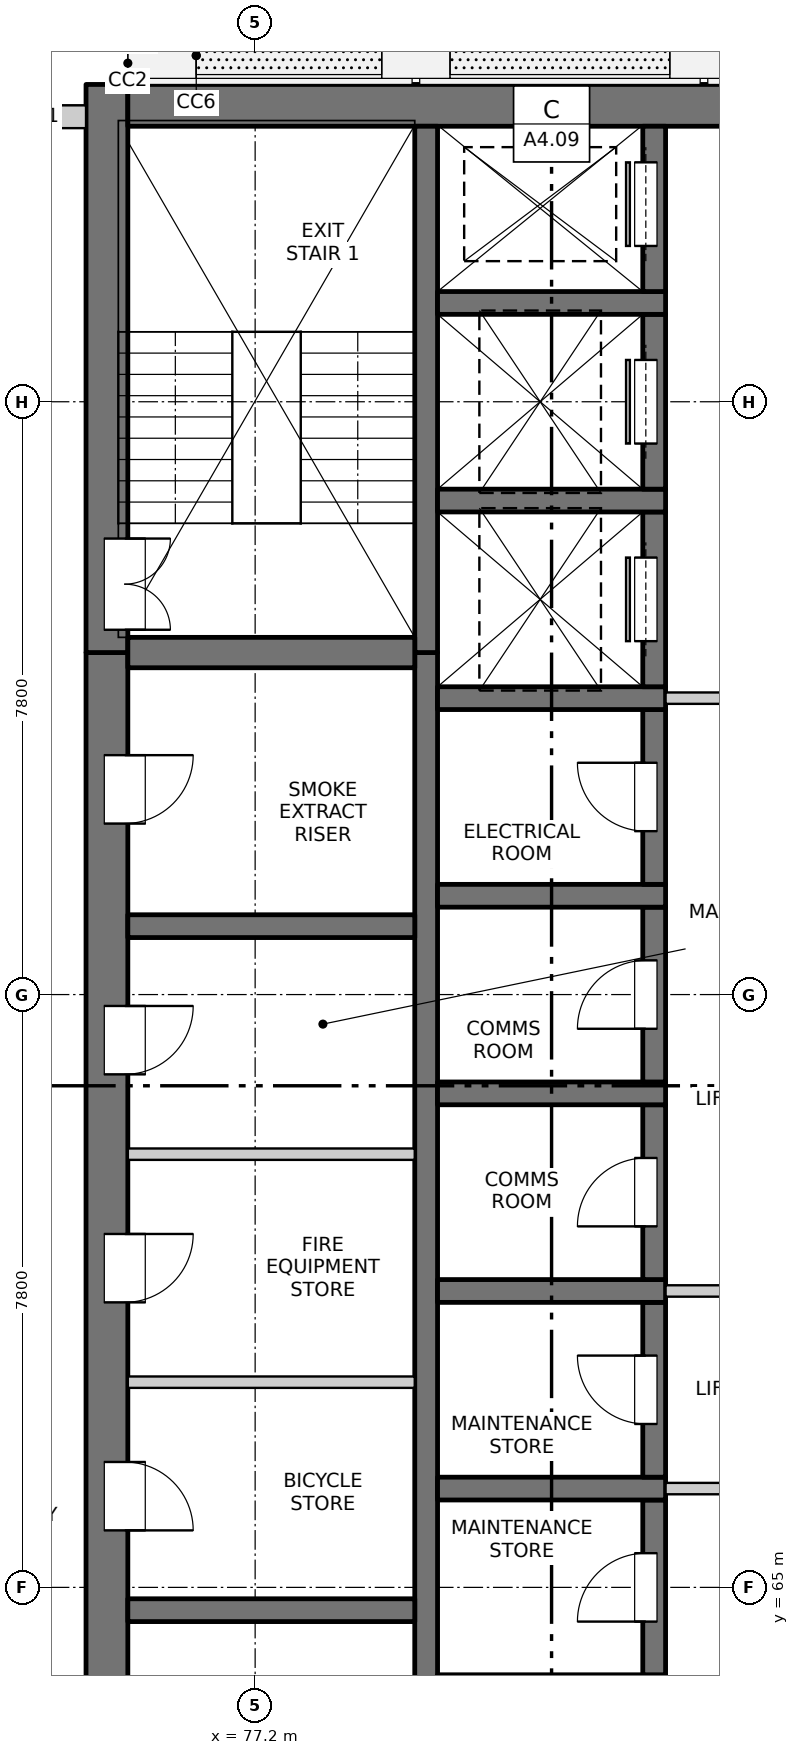
"""IFC4 building model, lengths in metres.
Left out: names, types, materials, properties, quantities, classifications, styles, units other than length and angle.
Written with IfcOpenShell. Run it as: python <this file> out.ifc"""

import sys

from ifc_helpers import new_model, si_unit, direction, frame, frame_2d, origin, place, context, subcontext, project, spatial, rectangle, extrude, element, fill, save


model = new_model("IFC4")
c1 = context("Model", 3, precision=1e-05, world=origin(), true_north=direction((0.0, 1.0)))
c2 = subcontext(c1, "Body", "Model", "MODEL_VIEW")
j1 = project(units=[si_unit("LENGTHUNIT", "METRE"), si_unit("PLANEANGLEUNIT", "RADIAN")], contexts=[c1])
p1 = place(None, origin())
s1 = spatial("IfcSite", under=j1, at=p1, CompositionType="ELEMENT")
p2 = place(p1, origin())
s2 = spatial("IfcBuilding", under=s1, at=p2, CompositionType="ELEMENT")
p3 = place(p2, frame((0.0, 0.0, 189.4)))
s3 = spatial("IfcBuildingStorey", under=s2, at=p3, CompositionType="ELEMENT", Elevation=189.4)
p4 = place(p3, frame((75.25, 54.975, -0.25), z_axis=(0.0, 0.0, 1.0), x_axis=(0.0, 1.0, 0.0)))
e1 = element("IfcWall", 1, at=p4, inside=s3, PredefinedType="SOLIDWALL", context=c2, shape_type="SweptSolid", body=[
    extrude(rectangle(XDim=22.325, YDim=0.55, at=frame_2d((11.163, 0.0))), origin(), (0.0, 0.0, 1.0), 3.35),
])
p5 = place(p4, frame((7.475, 0.0, 0.25)))
e2 = element("IfcOpeningElement", 2, at=p5, cuts=e1, PredefinedType="OPENING", context=c2, shape_type="SweptSolid", body=[
    extrude(rectangle(XDim=0.9, YDim=2.1, at=frame_2d((0.45, 1.05))), frame((0.0, 0.285, 0.0), z_axis=(0.0, -1.0, 0.0), x_axis=(1.0, 0.0, 0.0)), (0.0, 0.0, 1.0), 0.57),
])
p6 = place(p4, frame((10.775, 0.0, 0.25)))
e3 = element("IfcOpeningElement", 3, at=p6, cuts=e1, PredefinedType="OPENING", context=c2, shape_type="SweptSolid", body=[
    extrude(rectangle(XDim=0.9, YDim=2.1, at=frame_2d((0.45, 1.05))), frame((0.0, 0.285, 0.0), z_axis=(0.0, -1.0, 0.0), x_axis=(1.0, 0.0, 0.0)), (0.0, 0.0, 1.0), 0.57),
])
p7 = place(p4, frame((13.775, 0.0, 0.25)))
e4 = element("IfcOpeningElement", 4, at=p7, cuts=e1, PredefinedType="OPENING", context=c2, shape_type="SweptSolid", body=[
    extrude(rectangle(XDim=0.9, YDim=2.1, at=frame_2d((0.45, 1.05))), frame((0.0, 0.285, 0.0), z_axis=(0.0, -1.0, 0.0), x_axis=(1.0, 0.0, 0.0)), (0.0, 0.0, 1.0), 0.57),
])
p8 = place(p4, frame((16.775, 0.0, 0.25)))
e5 = element("IfcOpeningElement", 5, at=p8, cuts=e1, PredefinedType="OPENING", context=c2, shape_type="SweptSolid", body=[
    extrude(rectangle(XDim=0.9, YDim=2.1, at=frame_2d((0.45, 1.05))), frame((0.0, 0.285, 0.0), z_axis=(0.0, -1.0, 0.0), x_axis=(1.0, 0.0, 0.0)), (0.0, 0.0, 1.0), 0.57),
])
p9 = place(p4, frame((20.075, 0.0, 0.25)))
e6 = element("IfcOpeningElement", 6, at=p9, cuts=e1, PredefinedType="OPENING", context=c2, shape_type="SweptSolid", body=[
    extrude(rectangle(XDim=0.9, YDim=2.1, at=frame_2d((0.45, 1.05))), frame((0.0, 0.285, 0.0), z_axis=(0.0, -1.0, 0.0), x_axis=(1.0, 0.0, 0.0)), (0.0, 0.0, 1.0), 0.57),
])
p10 = place(p3, frame((75.25, 77.3, -0.25), z_axis=(0.0, 0.0, 1.0), x_axis=(0.0, 1.0, 0.0)))
e7 = element("IfcWall", 7, at=p10, inside=s3, PredefinedType="SOLIDWALL", context=c2, shape_type="SweptSolid", body=[
    extrude(rectangle(XDim=7.475, YDim=0.55, at=frame_2d((3.737, 0.0))), origin(), (0.0, 0.0, 1.0), 3.35),
])
p11 = place(p10, frame((0.3, 0.0, 0.25)))
e8 = element("IfcOpeningElement", 8, at=p11, cuts=e7, PredefinedType="OPENING", context=c2, shape_type="SweptSolid", body=[
    extrude(rectangle(XDim=1.2, YDim=2.1, at=frame_2d((0.6, 1.05))), frame((0.0, 0.285, 0.0), z_axis=(0.0, -1.0, 0.0), x_axis=(1.0, 0.0, 0.0)), (0.0, 0.0, 1.0), 0.57),
])
p12 = place(p3, frame((75.525, 84.5, -0.25), z_axis=(0.0, 0.0, 1.0), x_axis=(1.0, 0.0, 0.0)))
e9 = element("IfcWall", 9, at=p12, inside=s3, PredefinedType="SOLIDWALL", context=c2, shape_type="SweptSolid", body=[
    extrude(rectangle(XDim=18.95, YDim=0.55, at=frame_2d((9.475, 0.0))), origin(), (0.0, 0.0, 1.0), 3.35),
])
p13 = place(p3, frame((79.45, 60.95, -0.25), z_axis=(0.0, 0.0, 1.0), x_axis=(0.0, 1.0, 0.0)))
e10 = element("IfcWall", 10, at=p13, inside=s3, PredefinedType="SOLIDWALL", context=c2, shape_type="SweptSolid", body=[
    extrude(rectangle(XDim=16.35, YDim=0.3, at=frame_2d((8.175, 0.0))), origin(), (0.0, 0.0, 1.0), 3.35),
])
p14 = place(p3, frame((79.45, 77.3, -0.25), z_axis=(0.0, 0.0, 1.0), x_axis=(0.0, 1.0, 0.0)))
e11 = element("IfcWall", 11, at=p14, inside=s3, PredefinedType="SOLIDWALL", context=c2, shape_type="SweptSolid", body=[
    extrude(rectangle(XDim=6.925, YDim=0.3, at=frame_2d((3.462, 0.0))), origin(), (0.0, 0.0, 1.0), 3.35),
])
p15 = place(p3, frame((82.45, 63.85, -0.25), z_axis=(0.0, 0.0, 1.0), x_axis=(0.0, 1.0, 0.0)))
e12 = element("IfcWall", 12, at=p15, inside=s3, PredefinedType="SOLIDWALL", context=c2, shape_type="SweptSolid", body=[
    extrude(rectangle(XDim=2.3, YDim=0.3, at=frame_2d((1.15, 0.0))), origin(), (0.0, 0.0, 1.0), 3.35),
])
p16 = place(p15, frame((0.7, 0.0, 0.25)))
e13 = element("IfcOpeningElement", 13, at=p16, cuts=e12, PredefinedType="OPENING", context=c2, shape_type="SweptSolid", body=[
    extrude(rectangle(XDim=0.9, YDim=2.1, at=frame_2d((0.45, 1.05))), frame((0.0, 0.16, 0.0), z_axis=(0.0, -1.0, 0.0), x_axis=(1.0, 0.0, 0.0)), (0.0, 0.0, 1.0), 0.32),
])
p17 = place(p3, frame((79.6, 66.3, -0.25), z_axis=(0.0, 0.0, 1.0), x_axis=(1.0, 0.0, 0.0)))
e14 = element("IfcWall", 14, at=p17, inside=s3, PredefinedType="SOLIDWALL", context=c2, shape_type="SweptSolid", body=[
    extrude(rectangle(XDim=3.0, YDim=0.3, at=frame_2d((1.5, 0.0))), origin(), (0.0, 0.0, 1.0), 3.35),
])
p18 = place(p3, frame((82.45, 66.45, -0.25), z_axis=(0.0, 0.0, 1.0), x_axis=(0.0, 1.0, 0.0)))
e15 = element("IfcWall", 15, at=p18, inside=s3, PredefinedType="SOLIDWALL", context=c2, shape_type="SweptSolid", body=[
    extrude(rectangle(XDim=2.3, YDim=0.3, at=frame_2d((1.15, 0.0))), origin(), (0.0, 0.0, 1.0), 3.35),
])
p19 = place(p18, frame((0.7, 0.0, 0.25)))
e16 = element("IfcOpeningElement", 16, at=p19, cuts=e15, PredefinedType="OPENING", context=c2, shape_type="SweptSolid", body=[
    extrude(rectangle(XDim=0.9, YDim=2.1, at=frame_2d((0.45, 1.05))), frame((0.0, 0.16, 0.0), z_axis=(0.0, -1.0, 0.0), x_axis=(1.0, 0.0, 0.0)), (0.0, 0.0, 1.0), 0.32),
])
p20 = place(p3, frame((79.6, 68.9, -0.25), z_axis=(0.0, 0.0, 1.0), x_axis=(1.0, 0.0, 0.0)))
e17 = element("IfcWall", 17, at=p20, inside=s3, PredefinedType="SOLIDWALL", context=c2, shape_type="SweptSolid", body=[
    extrude(rectangle(XDim=3.0, YDim=0.3, at=frame_2d((1.5, 0.0))), origin(), (0.0, 0.0, 1.0), 3.35),
])
p21 = place(p3, frame((82.45, 69.05, -0.25), z_axis=(0.0, 0.0, 1.0), x_axis=(0.0, 1.0, 0.0)))
e18 = element("IfcWall", 18, at=p21, inside=s3, PredefinedType="SOLIDWALL", context=c2, shape_type="SweptSolid", body=[
    extrude(rectangle(XDim=2.3, YDim=0.3, at=frame_2d((1.15, 0.0))), origin(), (0.0, 0.0, 1.0), 3.35),
])
p22 = place(p21, frame((0.7, 0.0, 0.25)))
e19 = element("IfcOpeningElement", 19, at=p22, cuts=e18, PredefinedType="OPENING", context=c2, shape_type="SweptSolid", body=[
    extrude(rectangle(XDim=0.9, YDim=2.1, at=frame_2d((0.45, 1.05))), frame((0.0, 0.16, 0.0), z_axis=(0.0, -1.0, 0.0), x_axis=(1.0, 0.0, 0.0)), (0.0, 0.0, 1.0), 0.32),
])
p23 = place(p3, frame((79.6, 71.5, -0.25), z_axis=(0.0, 0.0, 1.0), x_axis=(1.0, 0.0, 0.0)))
e20 = element("IfcWall", 20, at=p23, inside=s3, PredefinedType="SOLIDWALL", context=c2, shape_type="SweptSolid", body=[
    extrude(rectangle(XDim=3.0, YDim=0.3, at=frame_2d((1.5, 0.0))), origin(), (0.0, 0.0, 1.0), 3.35),
])
p24 = place(p3, frame((82.45, 71.65, -0.25), z_axis=(0.0, 0.0, 1.0), x_axis=(0.0, 1.0, 0.0)))
e21 = element("IfcWall", 21, at=p24, inside=s3, PredefinedType="SOLIDWALL", context=c2, shape_type="SweptSolid", body=[
    extrude(rectangle(XDim=2.3, YDim=0.3, at=frame_2d((1.15, 0.0))), origin(), (0.0, 0.0, 1.0), 3.35),
])
p25 = place(p24, frame((0.7, 0.0, 0.25)))
e22 = element("IfcOpeningElement", 22, at=p25, cuts=e21, PredefinedType="OPENING", context=c2, shape_type="SweptSolid", body=[
    extrude(rectangle(XDim=0.9, YDim=2.1, at=frame_2d((0.45, 1.05))), frame((0.0, 0.16, 0.0), z_axis=(0.0, -1.0, 0.0), x_axis=(1.0, 0.0, 0.0)), (0.0, 0.0, 1.0), 0.32),
])
p26 = place(p3, frame((79.6, 74.1, -0.25), z_axis=(0.0, 0.0, 1.0), x_axis=(1.0, 0.0, 0.0)))
e23 = element("IfcWall", 23, at=p26, inside=s3, PredefinedType="SOLIDWALL", context=c2, shape_type="SweptSolid", body=[
    extrude(rectangle(XDim=3.0, YDim=0.3, at=frame_2d((1.5, 0.0))), origin(), (0.0, 0.0, 1.0), 3.35),
])
p27 = place(p3, frame((82.45, 74.25, -0.25), z_axis=(0.0, 0.0, 1.0), x_axis=(0.0, 1.0, 0.0)))
e24 = element("IfcWall", 24, at=p27, inside=s3, PredefinedType="SOLIDWALL", context=c2, shape_type="SweptSolid", body=[
    extrude(rectangle(XDim=2.3, YDim=0.3, at=frame_2d((1.15, 0.0))), origin(), (0.0, 0.0, 1.0), 3.35),
])
p28 = place(p27, frame((0.7, 0.0, 0.25)))
e25 = element("IfcOpeningElement", 25, at=p28, cuts=e24, PredefinedType="OPENING", context=c2, shape_type="SweptSolid", body=[
    extrude(rectangle(XDim=0.9, YDim=2.1, at=frame_2d((0.45, 1.05))), frame((0.0, 0.16, 0.0), z_axis=(0.0, -1.0, 0.0), x_axis=(1.0, 0.0, 0.0)), (0.0, 0.0, 1.0), 0.32),
])
p29 = place(p3, frame((79.6, 76.7, -0.25), z_axis=(0.0, 0.0, 1.0), x_axis=(1.0, 0.0, 0.0)))
e26 = element("IfcWall", 26, at=p29, inside=s3, PredefinedType="SOLIDWALL", context=c2, shape_type="SweptSolid", body=[
    extrude(rectangle(XDim=3.0, YDim=0.3, at=frame_2d((1.5, 0.0))), origin(), (0.0, 0.0, 1.0), 3.35),
])
p30 = place(p3, frame((82.45, 76.85, -0.25), z_axis=(0.0, 0.0, 1.0), x_axis=(0.0, 1.0, 0.0)))
e27 = element("IfcWall", 27, at=p30, inside=s3, PredefinedType="SOLIDWALL", context=c2, shape_type="SweptSolid", body=[
    extrude(rectangle(XDim=2.3, YDim=0.3, at=frame_2d((1.15, 0.0))), origin(), (0.0, 0.0, 1.0), 3.35),
])
p31 = place(p30, frame((0.6, 0.0, 0.25)))
e28 = element("IfcOpeningElement", 28, at=p31, cuts=e27, PredefinedType="OPENING", context=c2, shape_type="SweptSolid", body=[
    extrude(rectangle(XDim=1.1, YDim=2.1, at=frame_2d((0.55, 1.05))), frame((0.0, 0.16, 0.0), z_axis=(0.0, -1.0, 0.0), x_axis=(1.0, 0.0, 0.0)), (0.0, 0.0, 1.0), 0.32),
])
p32 = place(p3, frame((79.6, 79.3, -0.25), z_axis=(0.0, 0.0, 1.0), x_axis=(1.0, 0.0, 0.0)))
e29 = element("IfcWall", 29, at=p32, inside=s3, PredefinedType="SOLIDWALL", context=c2, shape_type="SweptSolid", body=[
    extrude(rectangle(XDim=3.0, YDim=0.3, at=frame_2d((1.5, 0.0))), origin(), (0.0, 0.0, 1.0), 3.35),
])
p33 = place(p3, frame((82.45, 79.45, -0.25), z_axis=(0.0, 0.0, 1.0), x_axis=(0.0, 1.0, 0.0)))
e30 = element("IfcWall", 30, at=p33, inside=s3, PredefinedType="SOLIDWALL", context=c2, shape_type="SweptSolid", body=[
    extrude(rectangle(XDim=2.3, YDim=0.3, at=frame_2d((1.15, 0.0))), origin(), (0.0, 0.0, 1.0), 3.35),
])
p34 = place(p33, frame((0.6, 0.0, 0.25)))
e31 = element("IfcOpeningElement", 31, at=p34, cuts=e30, PredefinedType="OPENING", context=c2, shape_type="SweptSolid", body=[
    extrude(rectangle(XDim=1.1, YDim=2.1, at=frame_2d((0.55, 1.05))), frame((0.0, 0.16, 0.0), z_axis=(0.0, -1.0, 0.0), x_axis=(1.0, 0.0, 0.0)), (0.0, 0.0, 1.0), 0.32),
])
p35 = place(p3, frame((79.6, 81.9, -0.25), z_axis=(0.0, 0.0, 1.0), x_axis=(1.0, 0.0, 0.0)))
e32 = element("IfcWall", 32, at=p35, inside=s3, PredefinedType="SOLIDWALL", context=c2, shape_type="SweptSolid", body=[
    extrude(rectangle(XDim=3.0, YDim=0.3, at=frame_2d((1.5, 0.0))), origin(), (0.0, 0.0, 1.0), 3.35),
])
p36 = place(p3, frame((82.45, 82.05, -0.25), z_axis=(0.0, 0.0, 1.0), x_axis=(0.0, 1.0, 0.0)))
e33 = element("IfcWall", 33, at=p36, inside=s3, PredefinedType="SOLIDWALL", context=c2, shape_type="SweptSolid", body=[
    extrude(rectangle(XDim=2.175, YDim=0.3, at=frame_2d((1.087, 0.0))), origin(), (0.0, 0.0, 1.0), 3.35),
])
p37 = place(p36, frame((0.6, 0.0, 0.25)))
e34 = element("IfcOpeningElement", 34, at=p37, cuts=e33, PredefinedType="OPENING", context=c2, shape_type="SweptSolid", body=[
    extrude(rectangle(XDim=1.1, YDim=2.1, at=frame_2d((0.55, 1.05))), frame((0.0, 0.16, 0.0), z_axis=(0.0, -1.0, 0.0), x_axis=(1.0, 0.0, 0.0)), (0.0, 0.0, 1.0), 0.32),
])
for number, where, z_axis, x_axis in (
    (35, (75.525, 64.7, -0.25), (0.0, 0.0, 1.0), (1.0, 0.0, 0.0)),
    (36, (75.525, 73.7, -0.25), (0.0, 0.0, 1.0), (1.0, 0.0, 0.0)),
):
    element("IfcWall", number, at=place(p3, frame(where, z_axis=z_axis, x_axis=x_axis)), inside=s3, PredefinedType="SOLIDWALL", context=c2, shape_type="SweptSolid", body=[
        extrude(rectangle(XDim=3.775, YDim=0.3, at=frame_2d((1.888, 0.0))), origin(), (0.0, 0.0, 1.0), 3.35),
    ])
p38 = place(p3, frame((75.525, 77.3, -0.25), z_axis=(0.0, 0.0, 1.0), x_axis=(1.0, 0.0, 0.0)))
e37 = element("IfcWall", 37, at=p38, inside=s3, PredefinedType="SOLIDWALL", context=c2, shape_type="SweptSolid", body=[
    extrude(rectangle(XDim=3.775, YDim=0.4, at=frame_2d((1.888, 0.0))), origin(), (0.0, 0.0, 1.0), 3.35),
])
p39 = place(p3, frame((73.675, 84.35, 0.0), z_axis=(0.0, 0.0, 1.0), x_axis=(1.0, 0.0, 0.0)))
e38 = element("IfcWall", 38, at=p39, inside=s3, PredefinedType="SOLIDWALL", context=c2, shape_type="SweptSolid", body=[
    extrude(rectangle(XDim=1.3, YDim=0.3, at=frame_2d((0.65, 0.0))), origin(), (0.0, 0.0, 1.0), 3.1),
])
p40 = place(p3, frame((82.6, 66.3, 0.0), z_axis=(0.0, 0.0, 1.0), x_axis=(1.0, 0.0, 0.0)))
e39 = element("IfcWall", 39, at=p40, inside=s3, PredefinedType="PARTITIONING", context=c2, shape_type="SweptSolid", body=[
    extrude(rectangle(XDim=4.8, YDim=0.15, at=frame_2d((2.4, 0.0))), origin(), (0.0, 0.0, 1.0), 3.1),
])
p41 = place(p40, frame((1.5, 0.0, 0.0)))
e40 = element("IfcOpeningElement", 40, at=p41, cuts=e39, PredefinedType="OPENING", context=c2, shape_type="SweptSolid", body=[
    extrude(rectangle(XDim=1.8, YDim=2.1, at=frame_2d((0.9, 1.05))), frame((0.0, 0.085, 0.0), z_axis=(0.0, -1.0, 0.0), x_axis=(1.0, 0.0, 0.0)), (0.0, 0.0, 1.0), 0.17),
])
p42 = place(p3, frame((75.525, 67.7, 0.0), z_axis=(0.0, 0.0, 1.0), x_axis=(1.0, 0.0, 0.0)))
e41 = element("IfcWall", 41, at=p42, inside=s3, PredefinedType="PARTITIONING", context=c2, shape_type="SweptSolid", body=[
    extrude(rectangle(XDim=3.775, YDim=0.15, at=frame_2d((1.887, 0.0))), origin(), (0.0, 0.0, 1.0), 3.1),
])
p43 = place(p3, frame((82.6, 68.9, 0.0), z_axis=(0.0, 0.0, 1.0), x_axis=(1.0, 0.0, 0.0)))
e42 = element("IfcWall", 42, at=p43, inside=s3, PredefinedType="PARTITIONING", context=c2, shape_type="SweptSolid", body=[
    extrude(rectangle(XDim=4.8, YDim=0.15, at=frame_2d((2.4, 0.0))), origin(), (0.0, 0.0, 1.0), 3.1),
])
p44 = place(p43, frame((1.5, 0.0, 0.0)))
e43 = element("IfcOpeningElement", 43, at=p44, cuts=e42, PredefinedType="OPENING", context=c2, shape_type="SweptSolid", body=[
    extrude(rectangle(XDim=1.8, YDim=2.1, at=frame_2d((0.9, 1.05))), frame((0.0, 0.085, 0.0), z_axis=(0.0, -1.0, 0.0), x_axis=(1.0, 0.0, 0.0)), (0.0, 0.0, 1.0), 0.17),
])
p45 = place(p3, frame((75.525, 70.7, 0.0), z_axis=(0.0, 0.0, 1.0), x_axis=(1.0, 0.0, 0.0)))
e44 = element("IfcWall", 44, at=p45, inside=s3, PredefinedType="PARTITIONING", context=c2, shape_type="SweptSolid", body=[
    extrude(rectangle(XDim=3.775, YDim=0.15, at=frame_2d((1.887, 0.0))), origin(), (0.0, 0.0, 1.0), 3.1),
])
p46 = place(p3, frame((82.6, 76.7, 0.0), z_axis=(0.0, 0.0, 1.0), x_axis=(1.0, 0.0, 0.0)))
e45 = element("IfcWall", 45, at=p46, inside=s3, PredefinedType="PARTITIONING", context=c2, shape_type="SweptSolid", body=[
    extrude(rectangle(XDim=4.8, YDim=0.15, at=frame_2d((2.4, 0.0))), origin(), (0.0, 0.0, 1.0), 3.1),
])
p47 = place(p46, frame((1.5, 0.0, 0.0)))
e46 = element("IfcOpeningElement", 46, at=p47, cuts=e45, PredefinedType="OPENING", context=c2, shape_type="SweptSolid", body=[
    extrude(rectangle(XDim=1.8, YDim=2.1, at=frame_2d((0.9, 1.05))), frame((0.0, 0.085, 0.0), z_axis=(0.0, -1.0, 0.0), x_axis=(1.0, 0.0, 0.0)), (0.0, 0.0, 1.0), 0.17),
])
p48 = place(p16, origin())
e47 = element("IfcDoor", 47, at=p48, inside=s3, OperationType="SINGLE_SWING_LEFT", PredefinedType="DOOR", context=c2, shape_type="SweptSolid", body=[
    extrude(rectangle(XDim=0.9, YDim=2.1, at=frame_2d((0.45, 1.05))), frame((0.0, 0.135, 0.0), z_axis=(0.0, -1.0, 0.0), x_axis=(1.0, 0.0, 0.0)), (0.0, 0.0, 1.0), 0.05),
])
fill(e13, e47)
p49 = place(p6, origin())
e48 = element("IfcDoor", 48, at=p49, inside=s3, OperationType="SINGLE_SWING_RIGHT", PredefinedType="DOOR", context=c2, shape_type="SweptSolid", body=[
    extrude(rectangle(XDim=0.9, YDim=2.1, at=frame_2d((0.45, 1.05))), frame((0.0, -0.21, 0.0), z_axis=(0.0, -1.0, 0.0), x_axis=(1.0, 0.0, 0.0)), (0.0, 0.0, 1.0), 0.05),
])
fill(e3, e48)
p50 = place(p19, origin())
e49 = element("IfcDoor", 49, at=p50, inside=s3, OperationType="SINGLE_SWING_RIGHT", PredefinedType="DOOR", context=c2, shape_type="SweptSolid", body=[
    extrude(rectangle(XDim=0.9, YDim=2.1, at=frame_2d((0.45, 1.05))), frame((0.0, 0.135, 0.0), z_axis=(0.0, -1.0, 0.0), x_axis=(1.0, 0.0, 0.0)), (0.0, 0.0, 1.0), 0.05),
])
fill(e16, e49)
p51 = place(p7, origin())
e50 = element("IfcDoor", 50, at=p51, inside=s3, OperationType="SINGLE_SWING_LEFT", PredefinedType="DOOR", context=c2, shape_type="SweptSolid", body=[
    extrude(rectangle(XDim=0.9, YDim=2.1, at=frame_2d((0.45, 1.05))), frame((0.0, -0.21, 0.0), z_axis=(0.0, -1.0, 0.0), x_axis=(1.0, 0.0, 0.0)), (0.0, 0.0, 1.0), 0.05),
])
fill(e4, e50)
p52 = place(p22, origin())
e51 = element("IfcDoor", 51, at=p52, inside=s3, OperationType="SINGLE_SWING_LEFT", PredefinedType="DOOR", context=c2, shape_type="SweptSolid", body=[
    extrude(rectangle(XDim=0.9, YDim=2.1, at=frame_2d((0.45, 1.05))), frame((0.0, 0.135, 0.0), z_axis=(0.0, -1.0, 0.0), x_axis=(1.0, 0.0, 0.0)), (0.0, 0.0, 1.0), 0.05),
])
fill(e19, e51)
p53 = place(p8, origin())
e52 = element("IfcDoor", 52, at=p53, inside=s3, OperationType="SINGLE_SWING_LEFT", PredefinedType="DOOR", context=c2, shape_type="SweptSolid", body=[
    extrude(rectangle(XDim=0.9, YDim=2.1, at=frame_2d((0.45, 1.05))), frame((0.0, -0.21, 0.0), z_axis=(0.0, -1.0, 0.0), x_axis=(1.0, 0.0, 0.0)), (0.0, 0.0, 1.0), 0.05),
])
fill(e5, e52)
p54 = place(p25, origin())
e53 = element("IfcDoor", 53, at=p54, inside=s3, OperationType="SINGLE_SWING_LEFT", PredefinedType="DOOR", context=c2, shape_type="SweptSolid", body=[
    extrude(rectangle(XDim=0.9, YDim=2.1, at=frame_2d((0.45, 1.05))), frame((0.0, 0.135, 0.0), z_axis=(0.0, -1.0, 0.0), x_axis=(1.0, 0.0, 0.0)), (0.0, 0.0, 1.0), 0.05),
])
fill(e22, e53)
p55 = place(p28, origin())
e54 = element("IfcDoor", 54, at=p55, inside=s3, OperationType="SINGLE_SWING_RIGHT", PredefinedType="DOOR", context=c2, shape_type="SweptSolid", body=[
    extrude(rectangle(XDim=0.9, YDim=2.1, at=frame_2d((0.45, 1.05))), frame((0.0, 0.135, 0.0), z_axis=(0.0, -1.0, 0.0), x_axis=(1.0, 0.0, 0.0)), (0.0, 0.0, 1.0), 0.05),
])
fill(e25, e54)
p56 = place(p9, origin())
e55 = element("IfcDoor", 55, at=p56, inside=s3, OperationType="SINGLE_SWING_LEFT", PredefinedType="DOOR", context=c2, shape_type="SweptSolid", body=[
    extrude(rectangle(XDim=0.9, YDim=2.1, at=frame_2d((0.45, 1.05))), frame((0.0, -0.21, 0.0), z_axis=(0.0, -1.0, 0.0), x_axis=(1.0, 0.0, 0.0)), (0.0, 0.0, 1.0), 0.05),
])
fill(e6, e55)
p57 = place(p31, origin())
e56 = element("IfcDoor", 56, at=p57, inside=s3, OperationType="SLIDING_TO_LEFT", PredefinedType="DOOR", context=c2, shape_type="SweptSolid", body=[
    extrude(rectangle(XDim=1.1, YDim=2.1, at=frame_2d((0.55, 1.05))), frame((0.0, 0.135, 0.0), z_axis=(0.0, -1.0, 0.0), x_axis=(1.0, 0.0, 0.0)), (0.0, 0.0, 1.0), 0.05),
])
fill(e28, e56)
p58 = place(p11, origin())
e57 = element("IfcDoor", 57, at=p58, inside=s3, OperationType="DOUBLE_DOOR_SINGLE_SWING", PredefinedType="DOOR", context=c2, shape_type="SweptSolid", body=[
    extrude(rectangle(XDim=1.2, YDim=2.1, at=frame_2d((0.6, 1.05))), frame((0.0, -0.21, 0.0), z_axis=(0.0, -1.0, 0.0), x_axis=(1.0, 0.0, 0.0)), (0.0, 0.0, 1.0), 0.05),
])
fill(e8, e57)
p59 = place(p34, origin())
e58 = element("IfcDoor", 58, at=p59, inside=s3, OperationType="SLIDING_TO_LEFT", PredefinedType="DOOR", context=c2, shape_type="SweptSolid", body=[
    extrude(rectangle(XDim=1.1, YDim=2.1, at=frame_2d((0.55, 1.05))), frame((0.0, 0.135, 0.0), z_axis=(0.0, -1.0, 0.0), x_axis=(1.0, 0.0, 0.0)), (0.0, 0.0, 1.0), 0.05),
])
fill(e31, e58)
p60 = place(p37, origin())
e59 = element("IfcDoor", 59, at=p60, inside=s3, OperationType="SLIDING_TO_RIGHT", PredefinedType="DOOR", context=c2, shape_type="SweptSolid", body=[
    extrude(rectangle(XDim=1.1, YDim=2.1, at=frame_2d((0.55, 1.05))), frame((0.0, 0.135, 0.0), z_axis=(0.0, -1.0, 0.0), x_axis=(1.0, 0.0, 0.0)), (0.0, 0.0, 1.0), 0.05),
])
fill(e34, e59)
save(model, sys.argv[1])
